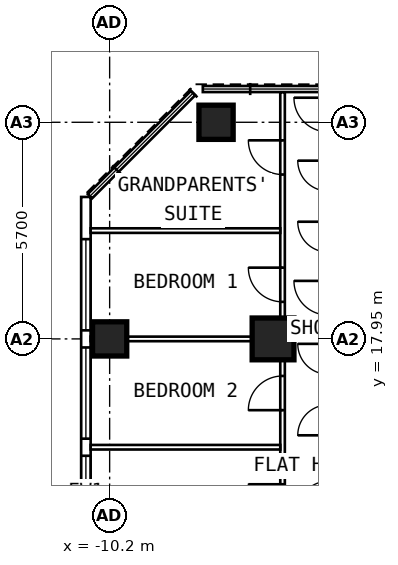
"""IFC4 building model, lengths in metres.
Left out: names, types, materials, properties, quantities, classifications, styles, units other than length and angle.
Written with IfcOpenShell. Run it as: python <this file> out.ifc"""

import sys

from ifc_helpers import new_model, si_unit, direction, frame, frame_2d, origin, origin_2d, place, context, subcontext, project, spatial, rectangle, extrude, element, fill, save


model = new_model("IFC4")
c1 = context("Model", 3, precision=1e-05, world=origin(), true_north=direction((0.0, 1.0)))
c2 = subcontext(c1, "Body", "Model", "MODEL_VIEW")
j1 = project(units=[si_unit("LENGTHUNIT", "METRE"), si_unit("PLANEANGLEUNIT", "RADIAN")], contexts=[c1])
p1 = place(None, origin())
s1 = spatial("IfcSite", under=j1, at=p1, CompositionType="ELEMENT")
p2 = place(p1, origin())
s2 = spatial("IfcBuilding", under=s1, at=p2, CompositionType="ELEMENT")
p3 = place(p2, frame((0.0, 0.0, 219.0)))
s3 = spatial("IfcBuildingStorey", under=s2, at=p3, CompositionType="ELEMENT", Elevation=219.0)
for number, where, z_axis, x_axis in (
    (1, (-10.2, 17.95, 0.0), (0.0, 0.0, 1.0), (0.0, 1.0, 0.0)),
    (2, (-7.4, 23.65, 0.0), (0.0, 0.0, 1.0), (0.0, 1.0, 0.0)),
):
    element("IfcColumn", number, at=place(p3, frame(where, z_axis=z_axis, x_axis=x_axis)), inside=s3, PredefinedType="COLUMN", context=c2, shape_type="SweptSolid", body=[
        extrude(rectangle(XDim=0.9, YDim=0.9, at=origin_2d()), origin(), (0.0, 0.0, 1.0), 3.6),
    ])
p4 = place(p3, frame((-5.9, 17.95, 0.0), z_axis=(0.0, 0.0, 1.0), x_axis=(0.0, 1.0, 0.0)))
e3 = element("IfcColumn", 3, at=p4, inside=s3, PredefinedType="COLUMN", context=c2, shape_type="SweptSolid", body=[
    extrude(rectangle(XDim=1.1, YDim=1.1, at=origin_2d()), origin(), (0.0, 0.0, 1.0), 3.6),
])
p5 = place(p3, frame((-10.825, 6.148, 0.0), z_axis=(0.0, 0.0, 1.0), x_axis=(0.0, 1.0, 0.0)))
e4 = element("IfcWall", 4, at=p5, inside=s3, PredefinedType="SOLIDWALL", context=c2, shape_type="SweptSolid", body=[
    extrude(rectangle(XDim=15.537, YDim=0.25, at=frame_2d((7.769, 0.0))), origin(), (0.0, 0.0, 1.0), 3.35),
])
p6 = place(p5, frame((0.627, 0.0, 0.8)))
e5 = element("IfcOpeningElement", 5, at=p6, cuts=e4, PredefinedType="OPENING", context=c2, shape_type="SweptSolid", body=[
    extrude(rectangle(XDim=2.4, YDim=1.8, at=frame_2d((1.2, 0.9))), frame((0.0, 0.137, 0.0), z_axis=(0.0, -1.0, 0.0), x_axis=(1.0, 0.0, 0.0)), (0.0, 0.0, 1.0), 0.274),
])
p7 = place(p5, frame((3.477, 0.0, 0.8)))
e6 = element("IfcOpeningElement", 6, at=p7, cuts=e4, PredefinedType="OPENING", context=c2, shape_type="SweptSolid", body=[
    extrude(rectangle(XDim=2.4, YDim=1.8, at=frame_2d((1.2, 0.9))), frame((0.0, 0.137, 0.0), z_axis=(0.0, -1.0, 0.0), x_axis=(1.0, 0.0, 0.0)), (0.0, 0.0, 1.0), 0.274),
])
p8 = place(p5, frame((6.327, 0.0, 0.8)))
e7 = element("IfcOpeningElement", 7, at=p8, cuts=e4, PredefinedType="OPENING", context=c2, shape_type="SweptSolid", body=[
    extrude(rectangle(XDim=2.4, YDim=1.8, at=frame_2d((1.2, 0.9))), frame((0.0, 0.137, 0.0), z_axis=(0.0, -1.0, 0.0), x_axis=(1.0, 0.0, 0.0)), (0.0, 0.0, 1.0), 0.274),
])
p9 = place(p5, frame((9.177, 0.0, 0.8)))
e8 = element("IfcOpeningElement", 8, at=p9, cuts=e4, PredefinedType="OPENING", context=c2, shape_type="SweptSolid", body=[
    extrude(rectangle(XDim=2.4, YDim=1.8, at=frame_2d((1.2, 0.9))), frame((0.0, 0.137, 0.0), z_axis=(0.0, -1.0, 0.0), x_axis=(1.0, 0.0, 0.0)), (0.0, 0.0, 1.0), 0.274),
])
p10 = place(p5, frame((12.027, 0.0, 0.8)))
e9 = element("IfcOpeningElement", 9, at=p10, cuts=e4, PredefinedType="OPENING", context=c2, shape_type="SweptSolid", body=[
    extrude(rectangle(XDim=2.4, YDim=1.8, at=frame_2d((1.2, 0.9))), frame((0.0, 0.137, 0.0), z_axis=(0.0, -1.0, 0.0), x_axis=(1.0, 0.0, 0.0)), (0.0, 0.0, 1.0), 0.274),
])
p11 = place(p3, frame((-5.65, 9.6, 0.0), z_axis=(0.0, 0.0, 1.0), x_axis=(0.0, 1.0, 0.0)))
e10 = element("IfcWall", 10, at=p11, inside=s3, PredefinedType="PARTITIONING", context=c2, shape_type="SweptSolid", body=[
    extrude(rectangle(XDim=14.845, YDim=0.12, at=frame_2d((7.422, 0.0))), origin(), (0.0, 0.0, 1.0), 3.35),
])
p12 = place(p11, frame((1.05, 0.0, 0.0)))
e11 = element("IfcOpeningElement", 11, at=p12, cuts=e10, PredefinedType="OPENING", context=c2, shape_type="SweptSolid", body=[
    extrude(rectangle(XDim=0.9, YDim=2.1, at=frame_2d((0.45, 1.05))), frame((0.0, 0.072, 0.0), z_axis=(0.0, -1.0, 0.0), x_axis=(1.0, 0.0, 0.0)), (0.0, 0.0, 1.0), 0.144),
])
p13 = place(p11, frame((3.625, 0.0, 0.0)))
e12 = element("IfcOpeningElement", 12, at=p13, cuts=e10, PredefinedType="OPENING", context=c2, shape_type="SweptSolid", body=[
    extrude(rectangle(XDim=0.9, YDim=2.1, at=frame_2d((0.45, 1.05))), frame((0.0, 0.072, 0.0), z_axis=(0.0, -1.0, 0.0), x_axis=(1.0, 0.0, 0.0)), (0.0, 0.0, 1.0), 0.144),
])
p14 = place(p11, frame((6.475, 0.0, 0.0)))
e13 = element("IfcOpeningElement", 13, at=p14, cuts=e10, PredefinedType="OPENING", context=c2, shape_type="SweptSolid", body=[
    extrude(rectangle(XDim=0.9, YDim=2.1, at=frame_2d((0.45, 1.05))), frame((0.0, 0.072, 0.0), z_axis=(0.0, -1.0, 0.0), x_axis=(1.0, 0.0, 0.0)), (0.0, 0.0, 1.0), 0.144),
])
p15 = place(p11, frame((9.325, 0.0, 0.0)))
e14 = element("IfcOpeningElement", 14, at=p15, cuts=e10, PredefinedType="OPENING", context=c2, shape_type="SweptSolid", body=[
    extrude(rectangle(XDim=0.9, YDim=2.1, at=frame_2d((0.45, 1.05))), frame((0.0, 0.072, 0.0), z_axis=(0.0, -1.0, 0.0), x_axis=(1.0, 0.0, 0.0)), (0.0, 0.0, 1.0), 0.144),
])
p16 = place(p11, frame((12.675, 0.0, 0.0)))
e15 = element("IfcOpeningElement", 15, at=p16, cuts=e10, PredefinedType="OPENING", context=c2, shape_type="SweptSolid", body=[
    extrude(rectangle(XDim=0.9, YDim=2.1, at=frame_2d((0.45, 1.05))), frame((0.0, 0.072, 0.0), z_axis=(0.0, -1.0, 0.0), x_axis=(1.0, 0.0, 0.0)), (0.0, 0.0, 1.0), 0.144),
])
p17 = place(p3, frame((-5.71, 15.1, 0.0), z_axis=(0.0, 0.0, 1.0), x_axis=(-1.0, 0.0, 0.0)))
e16 = element("IfcWall", 16, at=p17, inside=s3, PredefinedType="PARTITIONING", context=c2, shape_type="SweptSolid", body=[
    extrude(rectangle(XDim=4.99, YDim=0.12, at=frame_2d((2.495, 0.0))), origin(), (0.0, 0.0, 1.0), 3.35),
])
p18 = place(p3, frame((-5.71, 17.95, 0.0), z_axis=(0.0, 0.0, 1.0), x_axis=(-1.0, 0.0, 0.0)))
e17 = element("IfcWall", 17, at=p18, inside=s3, PredefinedType="PARTITIONING", context=c2, shape_type="SweptSolid", body=[
    extrude(rectangle(XDim=4.99, YDim=0.12, at=frame_2d((2.495, 0.0))), origin(), (0.0, 0.0, 1.0), 2.45),
])
p19 = place(p3, frame((-5.71, 20.8, 0.0), z_axis=(0.0, 0.0, 1.0), x_axis=(-1.0, 0.0, 0.0)))
e18 = element("IfcWall", 18, at=p19, inside=s3, PredefinedType="PARTITIONING", context=c2, shape_type="SweptSolid", body=[
    extrude(rectangle(XDim=4.99, YDim=0.12, at=frame_2d((2.495, 0.0))), origin(), (0.0, 0.0, 1.0), 3.35),
])
p20 = place(p8, origin())
e19 = element("IfcWindow", 19, at=p20, inside=s3, PartitioningType="SINGLE_PANEL", PredefinedType="WINDOW", context=c2, shape_type="SweptSolid", body=[
    extrude(rectangle(XDim=2.4, YDim=1.8, at=frame_2d((1.2, 0.9))), frame((0.0, 0.03, 0.0), z_axis=(0.0, -1.0, 0.0), x_axis=(1.0, 0.0, 0.0)), (0.0, 0.0, 1.0), 0.06),
])
fill(e7, e19)
p21 = place(p9, origin())
e20 = element("IfcWindow", 20, at=p21, inside=s3, PartitioningType="SINGLE_PANEL", PredefinedType="WINDOW", context=c2, shape_type="SweptSolid", body=[
    extrude(rectangle(XDim=2.4, YDim=1.8, at=frame_2d((1.2, 0.9))), frame((0.0, 0.03, 0.0), z_axis=(0.0, -1.0, 0.0), x_axis=(1.0, 0.0, 0.0)), (0.0, 0.0, 1.0), 0.06),
])
fill(e8, e20)
p22 = place(p10, origin())
e21 = element("IfcWindow", 21, at=p22, inside=s3, PartitioningType="SINGLE_PANEL", PredefinedType="WINDOW", context=c2, shape_type="SweptSolid", body=[
    extrude(rectangle(XDim=2.4, YDim=1.8, at=frame_2d((1.2, 0.9))), frame((0.0, 0.03, 0.0), z_axis=(0.0, -1.0, 0.0), x_axis=(1.0, 0.0, 0.0)), (0.0, 0.0, 1.0), 0.06),
])
fill(e9, e21)
p23 = place(p13, origin())
e22 = element("IfcDoor", 22, at=p23, inside=s3, OperationType="SINGLE_SWING_RIGHT", PredefinedType="DOOR", context=c2, shape_type="SweptSolid", body=[
    extrude(rectangle(XDim=0.9, YDim=2.1, at=frame_2d((0.45, 1.05))), frame((0.0, 0.025, 0.0), z_axis=(0.0, -1.0, 0.0), x_axis=(1.0, 0.0, 0.0)), (0.0, 0.0, 1.0), 0.05),
])
fill(e12, e22)
p24 = place(p14, origin())
e23 = element("IfcDoor", 23, at=p24, inside=s3, OperationType="SINGLE_SWING_LEFT", PredefinedType="DOOR", context=c2, shape_type="SweptSolid", body=[
    extrude(rectangle(XDim=0.9, YDim=2.1, at=frame_2d((0.45, 1.05))), frame((0.0, 0.025, 0.0), z_axis=(0.0, -1.0, 0.0), x_axis=(1.0, 0.0, 0.0)), (0.0, 0.0, 1.0), 0.05),
])
fill(e13, e23)
p25 = place(p15, origin())
e24 = element("IfcDoor", 24, at=p25, inside=s3, OperationType="SINGLE_SWING_RIGHT", PredefinedType="DOOR", context=c2, shape_type="SweptSolid", body=[
    extrude(rectangle(XDim=0.9, YDim=2.1, at=frame_2d((0.45, 1.05))), frame((0.0, 0.025, 0.0), z_axis=(0.0, -1.0, 0.0), x_axis=(1.0, 0.0, 0.0)), (0.0, 0.0, 1.0), 0.05),
])
fill(e14, e24)
p26 = place(p16, origin())
e25 = element("IfcDoor", 25, at=p26, inside=s3, OperationType="SINGLE_SWING_RIGHT", PredefinedType="DOOR", context=c2, shape_type="SweptSolid", body=[
    extrude(rectangle(XDim=0.9, YDim=2.1, at=frame_2d((0.45, 1.05))), frame((0.0, 0.025, 0.0), z_axis=(0.0, -1.0, 0.0), x_axis=(1.0, 0.0, 0.0)), (0.0, 0.0, 1.0), 0.05),
])
fill(e15, e25)
save(model, sys.argv[1])
